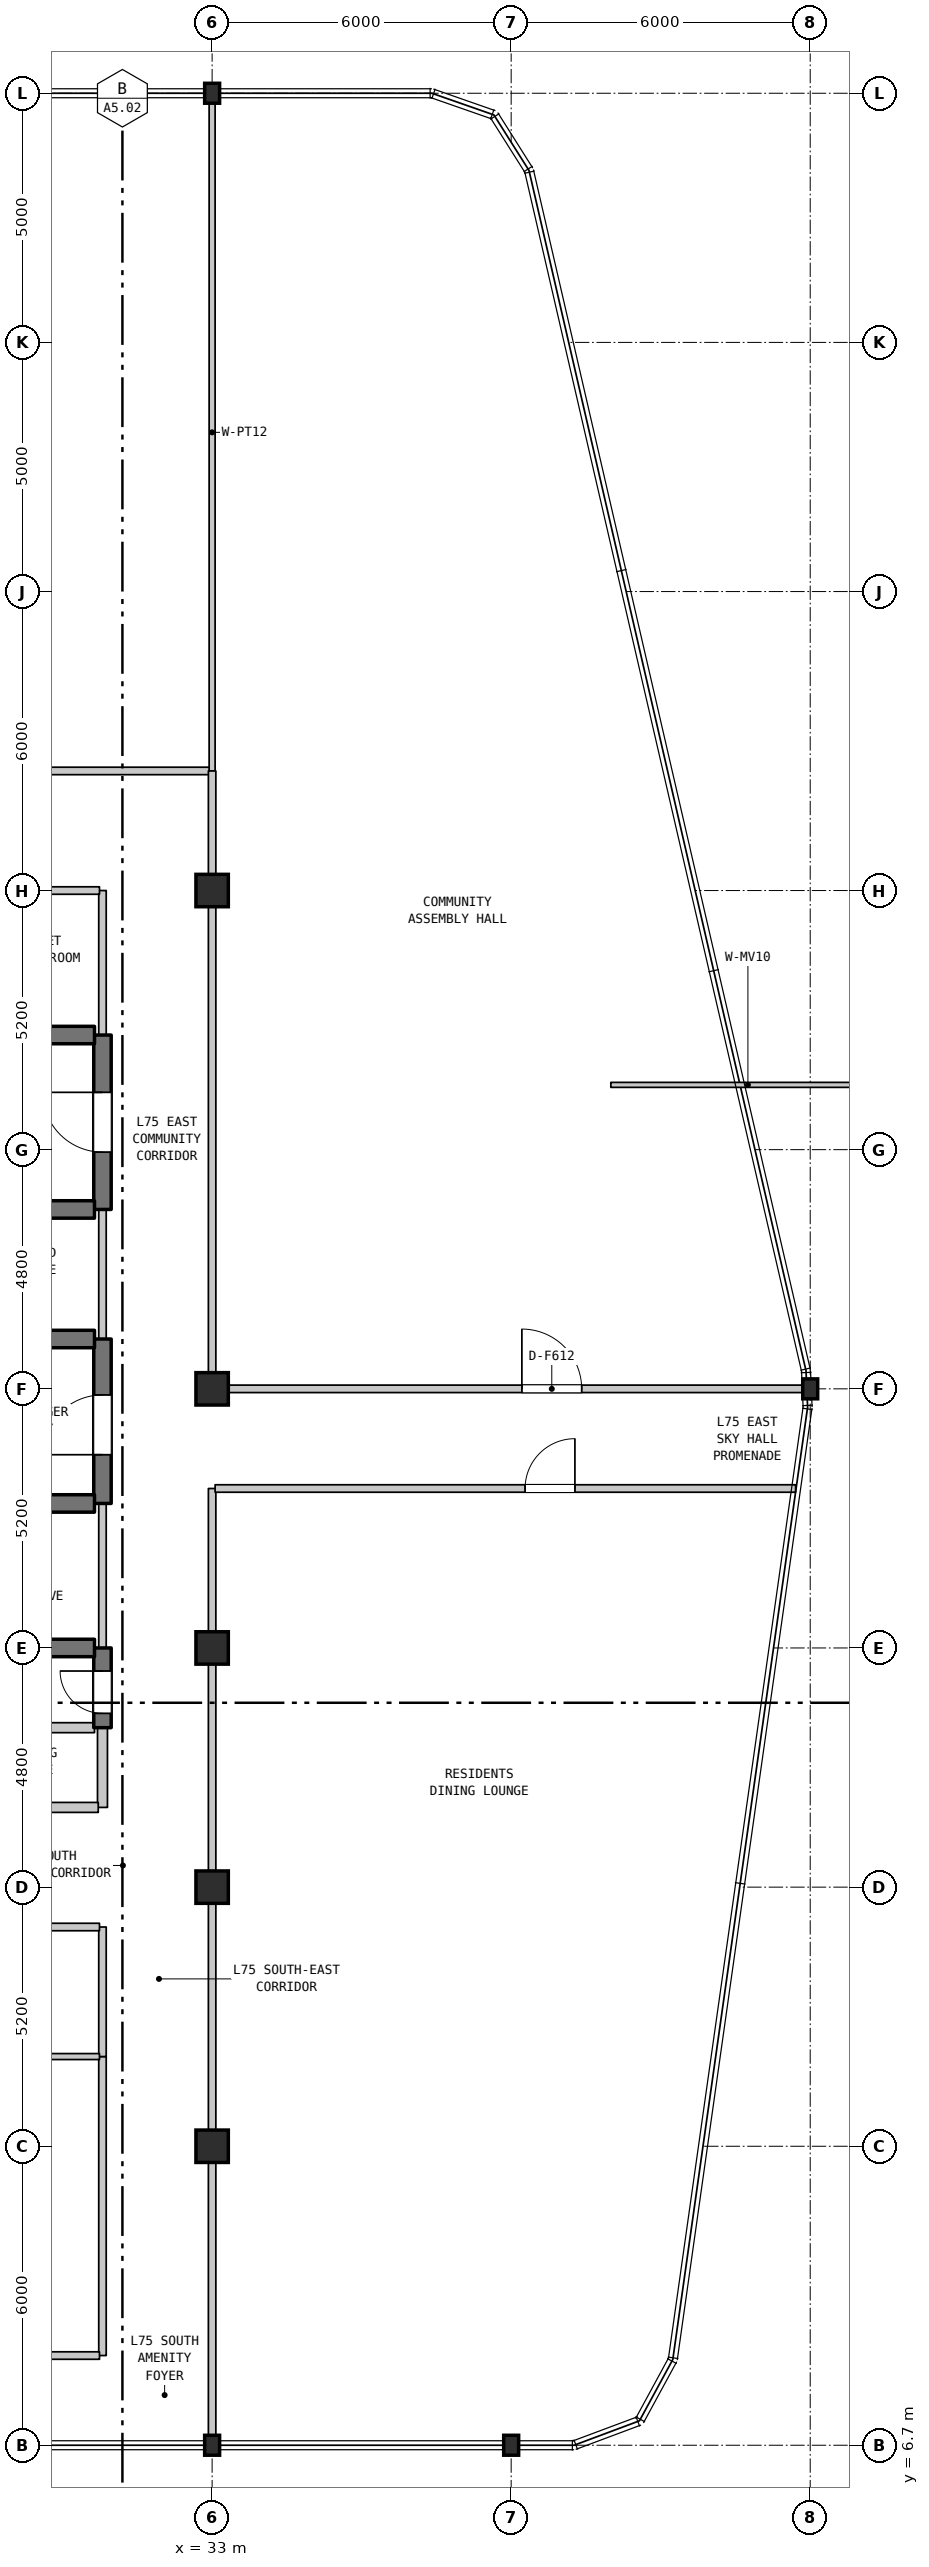
"""IFC4 building model, lengths in metres.
Left out: names, types, materials, properties, quantities, classifications, styles, units other than length and angle.
Written with IfcOpenShell. Run it as: python <this file> out.ifc"""

import sys

from ifc_helpers import new_model, si_unit, direction, frame, frame_2d, origin, origin_2d, place, context, subcontext, project, spatial, rectangle, i_section, extrude, element, fill, save


model = new_model("IFC4")
c1 = context("Model", 3, precision=1e-05, world=origin(), true_north=direction((0.0, 1.0)))
c2 = subcontext(c1, "Body", "Model", "MODEL_VIEW")
j1 = project(units=[si_unit("LENGTHUNIT", "METRE"), si_unit("PLANEANGLEUNIT", "RADIAN")], contexts=[c1])
p1 = place(None, origin())
s1 = spatial("IfcSite", under=j1, at=p1, CompositionType="ELEMENT")
p2 = place(p1, origin())
s2 = spatial("IfcBuilding", under=s1, at=p2, CompositionType="ELEMENT")
p3 = place(p2, frame((0.0, 0.0, 299.1)))
s3 = spatial("IfcBuildingStorey", under=s2, at=p3, CompositionType="ELEMENT", Elevation=299.1)
p4 = place(p3, frame((33.0, 6.7, 0.0), z_axis=(0.0, 0.0, 1.0), x_axis=(1.0, 0.0, 0.0)))
e1 = element("IfcColumn", 1, at=p4, inside=s3, PredefinedType="COLUMN", context=c2, shape_type="SweptSolid", body=[
    extrude(i_section(OverallWidth=0.3, OverallDepth=0.4, WebThickness=0.013, FlangeThickness=0.024, FilletRadius=0.027, at=origin_2d()), origin(), (0.0, 0.0, 1.0), 4.5),
])
for number, where, z_axis, x_axis in (
    (2, (33.0, 12.7, 0.0), (0.0, 0.0, 1.0), (1.0, 0.0, 0.0)),
    (3, (33.0, 17.9, 0.0), (0.0, 0.0, 1.0), (1.0, 0.0, 0.0)),
    (4, (33.0, 22.7, 0.0), (0.0, 0.0, 1.0), (1.0, 0.0, 0.0)),
    (5, (33.0, 27.9, 0.0), (0.0, 0.0, 1.0), (1.0, 0.0, 0.0)),
    (6, (33.0, 37.9, 0.0), (0.0, 0.0, 1.0), (1.0, 0.0, 0.0)),
):
    element("IfcColumn", number, at=place(p3, frame(where, z_axis=z_axis, x_axis=x_axis)), inside=s3, PredefinedType="COLUMN", context=c2, shape_type="SweptSolid", body=[
        extrude(rectangle(XDim=0.65, YDim=0.65, at=origin_2d()), origin(), (0.0, 0.0, 1.0), 4.5),
    ])
for number, where, z_axis, x_axis in (
    (7, (33.0, 53.9, 0.0), (0.0, 0.0, 1.0), (1.0, 0.0, 0.0)),
    (8, (39.0, 6.7, 0.0), (0.0, 0.0, 1.0), (1.0, 0.0, 0.0)),
    (9, (45.0, 27.9, 0.0), (0.0, 0.0, 1.0), (1.0, 0.0, 0.0)),
):
    element("IfcColumn", number, at=place(p3, frame(where, z_axis=z_axis, x_axis=x_axis)), inside=s3, PredefinedType="COLUMN", context=c2, shape_type="SweptSolid", body=[
        extrude(i_section(OverallWidth=0.3, OverallDepth=0.4, WebThickness=0.013, FlangeThickness=0.024, FilletRadius=0.027, at=origin_2d()), origin(), (0.0, 0.0, 1.0), 4.5),
    ])
p5 = place(p3, frame((30.8, 8.5, 0.0), z_axis=(0.0, 0.0, 1.0), x_axis=(0.0, 1.0, 0.0)))
e10 = element("IfcWall", 10, at=p5, inside=s3, PredefinedType="STANDARD", context=c2, shape_type="SweptSolid", body=[
    extrude(rectangle(XDim=6.0, YDim=0.15, at=frame_2d((3.0, 0.0))), origin(), (0.0, 0.0, 1.0), 4.19),
])
p6 = place(p3, frame((30.8, 14.5, 0.0), z_axis=(0.0, 0.0, 1.0), x_axis=(0.0, 1.0, 0.0)))
e11 = element("IfcWall", 11, at=p6, inside=s3, PredefinedType="STANDARD", context=c2, shape_type="SweptSolid", body=[
    extrude(rectangle(XDim=2.6, YDim=0.15, at=frame_2d((1.3, 0.0))), origin(), (0.0, 0.0, 1.0), 4.19),
])
p7 = place(p3, frame((30.8, 19.5, 0.0), z_axis=(0.0, 0.0, 1.0), x_axis=(0.0, 1.0, 0.0)))
e12 = element("IfcWall", 12, at=p7, inside=s3, PredefinedType="STANDARD", context=c2, shape_type="SweptSolid", body=[
    extrude(rectangle(XDim=1.6, YDim=0.2, at=frame_2d((0.8, 0.0))), origin(), (0.0, 0.0, 1.0), 4.19),
])
p8 = place(p3, frame((30.8, 21.1, 0.0), z_axis=(0.0, 0.0, 1.0), x_axis=(0.0, 1.0, 0.0)))
e13 = element("IfcWall", 13, at=p8, inside=s3, PredefinedType="SHEAR", context=c2, shape_type="SweptSolid", body=[
    extrude(rectangle(XDim=1.6, YDim=0.35, at=frame_2d((0.8, 0.0))), origin(), (0.0, 0.0, 1.0), 4.19),
])
p9 = place(p8, frame((0.287, 0.0, 0.0)))
e14 = element("IfcOpeningElement", 14, at=p9, cuts=e13, PredefinedType="OPENING", context=c2, shape_type="SweptSolid", body=[
    extrude(rectangle(XDim=0.85, YDim=2.1, at=frame_2d((0.425, 1.05))), frame((0.0, 0.185, 0.0), z_axis=(0.0, -1.0, 0.0), x_axis=(1.0, 0.0, 0.0)), (0.0, 0.0, 1.0), 0.37),
])
p10 = place(p3, frame((30.8, 22.7, 0.0), z_axis=(0.0, 0.0, 1.0), x_axis=(0.0, 1.0, 0.0)))
e15 = element("IfcWall", 15, at=p10, inside=s3, PredefinedType="STANDARD", context=c2, shape_type="SweptSolid", body=[
    extrude(rectangle(XDim=2.9, YDim=0.15, at=frame_2d((1.45, 0.0))), origin(), (0.0, 0.0, 1.0), 4.19),
])
p11 = place(p3, frame((30.8, 25.6, 0.0), z_axis=(0.0, 0.0, 1.0), x_axis=(0.0, 1.0, 0.0)))
e16 = element("IfcWall", 16, at=p11, inside=s3, PredefinedType="SHEAR", context=c2, shape_type="SweptSolid", body=[
    extrude(rectangle(XDim=3.3, YDim=0.35, at=frame_2d((1.65, 0.0))), origin(), (0.0, 0.0, 1.0), 4.19),
])
p12 = place(p11, frame((0.978, 0.0, 0.0)))
e17 = element("IfcOpeningElement", 17, at=p12, cuts=e16, PredefinedType="OPENING", context=c2, shape_type="SweptSolid", body=[
    extrude(rectangle(XDim=1.2, YDim=2.2, at=frame_2d((0.6, 1.1))), frame((0.0, 0.185, 0.0), z_axis=(0.0, -1.0, 0.0), x_axis=(1.0, 0.0, 0.0)), (0.0, 0.0, 1.0), 0.37),
])
p13 = place(p3, frame((30.8, 28.9, 0.0), z_axis=(0.0, 0.0, 1.0), x_axis=(0.0, 1.0, 0.0)))
e18 = element("IfcWall", 18, at=p13, inside=s3, PredefinedType="STANDARD", context=c2, shape_type="SweptSolid", body=[
    extrude(rectangle(XDim=2.6, YDim=0.15, at=frame_2d((1.3, 0.0))), origin(), (0.0, 0.0, 1.0), 4.19),
])
p14 = place(p3, frame((30.8, 31.5, 0.0), z_axis=(0.0, 0.0, 1.0), x_axis=(0.0, 1.0, 0.0)))
e19 = element("IfcWall", 19, at=p14, inside=s3, PredefinedType="SHEAR", context=c2, shape_type="SweptSolid", body=[
    extrude(rectangle(XDim=3.5, YDim=0.35, at=frame_2d((1.75, 0.0))), origin(), (0.0, 0.0, 1.0), 4.19),
])
p15 = place(p14, frame((1.15, 0.0, 0.0)))
e20 = element("IfcOpeningElement", 20, at=p15, cuts=e19, PredefinedType="OPENING", context=c2, shape_type="SweptSolid", body=[
    extrude(rectangle(XDim=1.2, YDim=2.2, at=frame_2d((0.6, 1.1))), frame((0.0, 0.185, 0.0), z_axis=(0.0, -1.0, 0.0), x_axis=(1.0, 0.0, 0.0)), (0.0, 0.0, 1.0), 0.37),
])
p16 = place(p3, frame((30.8, 35.0, 0.0), z_axis=(0.0, 0.0, 1.0), x_axis=(0.0, 1.0, 0.0)))
e21 = element("IfcWall", 21, at=p16, inside=s3, PredefinedType="STANDARD", context=c2, shape_type="SweptSolid", body=[
    extrude(rectangle(XDim=2.9, YDim=0.15, at=frame_2d((1.45, 0.0))), origin(), (0.0, 0.0, 1.0), 4.19),
])
p17 = place(p3, frame((33.0, 6.71, 0.0), z_axis=(0.0, 0.0, 1.0), x_axis=(0.0, 1.0, 0.0)))
e22 = element("IfcWall", 22, at=p17, inside=s3, PredefinedType="STANDARD", context=c2, shape_type="SweptSolid", body=[
    extrude(rectangle(XDim=19.19, YDim=0.15, at=frame_2d((9.595, 0.0))), origin(), (0.0, 0.0, 1.0), 3.9),
])
p18 = place(p3, frame((33.0, 27.9, 0.0), z_axis=(0.0, 0.0, 1.0), x_axis=(0.0, 1.0, 0.0)))
e23 = element("IfcWall", 23, at=p18, inside=s3, PredefinedType="STANDARD", context=c2, shape_type="SweptSolid", body=[
    extrude(rectangle(XDim=10.0, YDim=0.15, at=frame_2d((5.0, 0.0))), origin(), (0.0, 0.0, 1.0), 3.69),
])
p19 = place(p3, frame((33.0, 40.3, 0.0), z_axis=(0.0, 0.0, 1.0), x_axis=(0.0, 1.0, 0.0)))
e24 = element("IfcWall", 24, at=p19, inside=s3, PredefinedType="PARTITIONING", context=c2, shape_type="SweptSolid", body=[
    extrude(rectangle(XDim=13.59, YDim=0.12, at=frame_2d((6.795, 0.0))), origin(), (0.0, 0.0, 1.0), 3.59),
])
p20 = place(p3, frame((25.245, 8.5, 0.0), z_axis=(0.0, 0.0, 1.0), x_axis=(1.0, 0.0, 0.0)))
e25 = element("IfcWall", 25, at=p20, inside=s3, PredefinedType="STANDARD", context=c2, shape_type="SweptSolid", body=[
    extrude(rectangle(XDim=5.495, YDim=0.15, at=frame_2d((2.748, 0.0))), origin(), (0.0, 0.0, 1.0), 4.19),
])
p21 = place(p20, frame((2.469, 0.0, 0.0)))
e26 = element("IfcOpeningElement", 26, at=p21, cuts=e25, PredefinedType="OPENING", context=c2, shape_type="SweptSolid", body=[
    extrude(rectangle(XDim=1.0, YDim=2.15, at=frame_2d((0.5, 1.075))), frame((0.0, 0.085, 0.0), z_axis=(0.0, -1.0, 0.0), x_axis=(1.0, 0.0, 0.0)), (0.0, 0.0, 1.0), 0.17),
])
p22 = place(p3, frame((27.045, 14.5, 0.0), z_axis=(0.0, 0.0, 1.0), x_axis=(1.0, 0.0, 0.0)))
e27 = element("IfcWall", 27, at=p22, inside=s3, PredefinedType="PARTITIONING", context=c2, shape_type="SweptSolid", body=[
    extrude(rectangle(XDim=3.695, YDim=0.12, at=frame_2d((1.848, 0.0))), origin(), (0.0, 0.0, 1.0), 4.19),
])
p23 = place(p3, frame((27.045, 17.1, 0.0), z_axis=(0.0, 0.0, 1.0), x_axis=(1.0, 0.0, 0.0)))
e28 = element("IfcWall", 28, at=p23, inside=s3, PredefinedType="STANDARD", context=c2, shape_type="SweptSolid", body=[
    extrude(rectangle(XDim=3.695, YDim=0.15, at=frame_2d((1.848, 0.0))), origin(), (0.0, 0.0, 1.0), 4.19),
])
p24 = place(p3, frame((27.285, 19.5, 0.0), z_axis=(0.0, 0.0, 1.0), x_axis=(1.0, 0.0, 0.0)))
e29 = element("IfcWall", 29, at=p24, inside=s3, PredefinedType="STANDARD", context=c2, shape_type="SweptSolid", body=[
    extrude(rectangle(XDim=3.43, YDim=0.2, at=frame_2d((1.715, 0.0))), origin(), (0.0, 0.0, 1.0), 4.19),
])
p25 = place(p24, frame((1.192, 0.0, 0.0)))
e30 = element("IfcOpeningElement", 30, at=p25, cuts=e29, PredefinedType="OPENING", context=c2, shape_type="SweptSolid", body=[
    extrude(rectangle(XDim=0.9, YDim=2.15, at=frame_2d((0.45, 1.075))), frame((0.0, 0.11, 0.0), z_axis=(0.0, -1.0, 0.0), x_axis=(1.0, 0.0, 0.0)), (0.0, 0.0, 1.0), 0.22),
])
p26 = place(p3, frame((27.285, 21.1, 0.0), z_axis=(0.0, 0.0, 1.0), x_axis=(1.0, 0.0, 0.0)))
e31 = element("IfcWall", 31, at=p26, inside=s3, PredefinedType="STANDARD", context=c2, shape_type="SweptSolid", body=[
    extrude(rectangle(XDim=3.355, YDim=0.2, at=frame_2d((1.677, 0.0))), origin(), (0.0, 0.0, 1.0), 4.19),
])
p27 = place(p3, frame((27.46, 22.7, 0.0), z_axis=(0.0, 0.0, 1.0), x_axis=(1.0, 0.0, 0.0)))
e32 = element("IfcWall", 32, at=p27, inside=s3, PredefinedType="SHEAR", context=c2, shape_type="SweptSolid", body=[
    extrude(rectangle(XDim=3.18, YDim=0.35, at=frame_2d((1.59, 0.0))), origin(), (0.0, 0.0, 1.0), 4.19),
])
p28 = place(p3, frame((27.46, 25.6, 0.0), z_axis=(0.0, 0.0, 1.0), x_axis=(1.0, 0.0, 0.0)))
e33 = element("IfcWall", 33, at=p28, inside=s3, PredefinedType="SHEAR", context=c2, shape_type="SweptSolid", body=[
    extrude(rectangle(XDim=3.18, YDim=0.35, at=frame_2d((1.59, 0.0))), origin(), (0.0, 0.0, 1.0), 4.19),
])
p29 = place(p28, frame((1.115, 0.0, 0.0)))
e34 = element("IfcOpeningElement", 34, at=p29, cuts=e33, PredefinedType="OPENING", context=c2, shape_type="SweptSolid", body=[
    extrude(rectangle(XDim=0.95, YDim=2.15, at=frame_2d((0.475, 1.075))), frame((0.0, 0.185, 0.0), z_axis=(0.0, -1.0, 0.0), x_axis=(1.0, 0.0, 0.0)), (0.0, 0.0, 1.0), 0.37),
])
p30 = place(p3, frame((33.06, 25.9, 0.0), z_axis=(0.0, 0.0, 1.0), x_axis=(1.0, 0.0, 0.0)))
e35 = element("IfcWall", 35, at=p30, inside=s3, PredefinedType="STANDARD", context=c2, shape_type="SweptSolid", body=[
    extrude(rectangle(XDim=11.647, YDim=0.15, at=frame_2d((5.823, 0.0))), origin(), (0.0, 0.0, 1.0), 4.19),
])
p31 = place(p30, frame((6.219, 0.0, 0.0)))
e36 = element("IfcOpeningElement", 36, at=p31, cuts=e35, PredefinedType="OPENING", context=c2, shape_type="SweptSolid", body=[
    extrude(rectangle(XDim=1.0, YDim=2.15, at=frame_2d((0.5, 1.075))), frame((0.0, 0.085, 0.0), z_axis=(0.0, -1.0, 0.0), x_axis=(1.0, 0.0, 0.0)), (0.0, 0.0, 1.0), 0.17),
])
p32 = place(p3, frame((33.06, 27.9, 0.0), z_axis=(0.0, 0.0, 1.0), x_axis=(1.0, 0.0, 0.0)))
e37 = element("IfcWall", 37, at=p32, inside=s3, PredefinedType="STANDARD", context=c2, shape_type="SweptSolid", body=[
    extrude(rectangle(XDim=11.862, YDim=0.15, at=frame_2d((5.931, 0.0))), origin(), (0.0, 0.0, 1.0), 3.69),
])
p33 = place(p32, frame((6.155, 0.0, 0.0)))
e38 = element("IfcOpeningElement", 38, at=p33, cuts=e37, PredefinedType="OPENING", context=c2, shape_type="SweptSolid", body=[
    extrude(rectangle(XDim=1.2, YDim=2.2, at=frame_2d((0.6, 1.1))), frame((0.0, 0.085, 0.0), z_axis=(0.0, -1.0, 0.0), x_axis=(1.0, 0.0, 0.0)), (0.0, 0.0, 1.0), 0.17),
])
p34 = place(p3, frame((27.46, 28.9, 0.0), z_axis=(0.0, 0.0, 1.0), x_axis=(1.0, 0.0, 0.0)))
e39 = element("IfcWall", 39, at=p34, inside=s3, PredefinedType="SHEAR", context=c2, shape_type="SweptSolid", body=[
    extrude(rectangle(XDim=3.18, YDim=0.35, at=frame_2d((1.59, 0.0))), origin(), (0.0, 0.0, 1.0), 4.19),
])
p35 = place(p34, frame((1.115, 0.0, 0.0)))
e40 = element("IfcOpeningElement", 40, at=p35, cuts=e39, PredefinedType="OPENING", context=c2, shape_type="SweptSolid", body=[
    extrude(rectangle(XDim=0.95, YDim=2.15, at=frame_2d((0.475, 1.075))), frame((0.0, 0.185, 0.0), z_axis=(0.0, -1.0, 0.0), x_axis=(1.0, 0.0, 0.0)), (0.0, 0.0, 1.0), 0.37),
])
p36 = place(p3, frame((27.46, 31.5, 0.0), z_axis=(0.0, 0.0, 1.0), x_axis=(1.0, 0.0, 0.0)))
e41 = element("IfcWall", 41, at=p36, inside=s3, PredefinedType="SHEAR", context=c2, shape_type="SweptSolid", body=[
    extrude(rectangle(XDim=3.18, YDim=0.35, at=frame_2d((1.59, 0.0))), origin(), (0.0, 0.0, 1.0), 4.19),
])
p37 = place(p3, frame((26.645, 35.0, 0.0), z_axis=(0.0, 0.0, 1.0), x_axis=(1.0, 0.0, 0.0)))
e42 = element("IfcWall", 42, at=p37, inside=s3, PredefinedType="SHEAR", context=c2, shape_type="SweptSolid", body=[
    extrude(rectangle(XDim=3.995, YDim=0.35, at=frame_2d((1.998, 0.0))), origin(), (0.0, 0.0, 1.0), 4.19),
])
p38 = place(p37, frame((1.508, 0.0, 0.0)))
e43 = element("IfcOpeningElement", 43, at=p38, cuts=e42, PredefinedType="OPENING", context=c2, shape_type="SweptSolid", body=[
    extrude(rectangle(XDim=0.95, YDim=2.15, at=frame_2d((0.475, 1.075))), frame((0.0, 0.185, 0.0), z_axis=(0.0, -1.0, 0.0), x_axis=(1.0, 0.0, 0.0)), (0.0, 0.0, 1.0), 0.37),
])
p39 = place(p3, frame((26.645, 37.9, 0.0), z_axis=(0.0, 0.0, 1.0), x_axis=(1.0, 0.0, 0.0)))
e44 = element("IfcWall", 44, at=p39, inside=s3, PredefinedType="STANDARD", context=c2, shape_type="SweptSolid", body=[
    extrude(rectangle(XDim=4.095, YDim=0.15, at=frame_2d((2.047, 0.0))), origin(), (0.0, 0.0, 1.0), 3.69),
])
p40 = place(p3, frame((15.045, 40.3, 0.0), z_axis=(0.0, 0.0, 1.0), x_axis=(1.0, 0.0, 0.0)))
e45 = element("IfcWall", 45, at=p40, inside=s3, PredefinedType="STANDARD", context=c2, shape_type="SweptSolid", body=[
    extrude(rectangle(XDim=17.895, YDim=0.15, at=frame_2d((8.948, 0.0))), origin(), (0.0, 0.0, 1.0), 4.19),
])
p41 = place(p40, frame((9.205, 0.0, 0.0)))
e46 = element("IfcOpeningElement", 46, at=p41, cuts=e45, PredefinedType="OPENING", context=c2, shape_type="SweptSolid", body=[
    extrude(rectangle(XDim=1.0, YDim=2.15, at=frame_2d((0.5, 1.075))), frame((0.0, 0.085, 0.0), z_axis=(0.0, -1.0, 0.0), x_axis=(1.0, 0.0, 0.0)), (0.0, 0.0, 1.0), 0.17),
])
p42 = place(p3, frame((41.0, 34.0, 0.0), z_axis=(0.0, 0.0, 1.0), x_axis=(1.0, 0.0, 0.0)))
e47 = element("IfcWall", 47, at=p42, inside=s3, PredefinedType="MOVABLE", context=c2, shape_type="SweptSolid", body=[
    extrude(rectangle(XDim=5.5, YDim=0.1, at=frame_2d((2.75, 0.0))), origin(), (0.0, 0.0, 1.0), 4.14),
])
p43 = place(p3, frame((33.0, 37.9, 0.0), z_axis=(0.0, 0.0, 1.0), x_axis=(0.0, 1.0, 0.0)))
e48 = element("IfcWall", 48, at=p43, inside=s3, PredefinedType="STANDARD", context=c2, shape_type="SweptSolid", body=[
    extrude(rectangle(XDim=2.4, YDim=0.15, at=frame_2d((1.2, 0.0))), origin(), (0.0, 0.0, 1.0), 3.59),
])
p44 = place(p9, origin())
e49 = element("IfcDoor", 49, at=p44, inside=s3, OperationType="SINGLE_SWING_RIGHT", PredefinedType="DOOR", context=c2, shape_type="SweptSolid", body=[
    extrude(rectangle(XDim=0.85, YDim=2.1, at=frame_2d((0.425, 1.05))), frame((0.0, 0.025, 0.0), z_axis=(0.0, -1.0, 0.0), x_axis=(1.0, 0.0, 0.0)), (0.0, 0.0, 1.0), 0.05),
])
fill(e14, e49)
p45 = place(p12, origin())
e50 = element("IfcDoor", 50, at=p45, inside=s3, OperationType="SINGLE_SWING_LEFT", PredefinedType="DOOR", context=c2, shape_type="SweptSolid", body=[
    extrude(rectangle(XDim=1.2, YDim=2.2, at=frame_2d((0.6, 1.1))), frame((0.0, 0.025, 0.0), z_axis=(0.0, -1.0, 0.0), x_axis=(1.0, 0.0, 0.0)), (0.0, 0.0, 1.0), 0.05),
])
fill(e17, e50)
p46 = place(p15, origin())
e51 = element("IfcDoor", 51, at=p46, inside=s3, OperationType="SINGLE_SWING_RIGHT", PredefinedType="DOOR", context=c2, shape_type="SweptSolid", body=[
    extrude(rectangle(XDim=1.2, YDim=2.2, at=frame_2d((0.6, 1.1))), frame((0.0, 0.025, 0.0), z_axis=(0.0, -1.0, 0.0), x_axis=(1.0, 0.0, 0.0)), (0.0, 0.0, 1.0), 0.05),
])
fill(e20, e51)
p47 = place(p31, origin())
e52 = element("IfcDoor", 52, at=p47, inside=s3, OperationType="SINGLE_SWING_RIGHT", PredefinedType="DOOR", context=c2, shape_type="SweptSolid", body=[
    extrude(rectangle(XDim=1.0, YDim=2.15, at=frame_2d((0.5, 1.075))), frame((0.0, 0.025, 0.0), z_axis=(0.0, -1.0, 0.0), x_axis=(1.0, 0.0, 0.0)), (0.0, 0.0, 1.0), 0.05),
])
fill(e36, e52)
p48 = place(p33, origin())
e53 = element("IfcDoor", 53, at=p48, inside=s3, OperationType="SINGLE_SWING_LEFT", PredefinedType="DOOR", context=c2, shape_type="SweptSolid", body=[
    extrude(rectangle(XDim=1.2, YDim=2.2, at=frame_2d((0.6, 1.1))), frame((0.0, 0.025, 0.0), z_axis=(0.0, -1.0, 0.0), x_axis=(1.0, 0.0, 0.0)), (0.0, 0.0, 1.0), 0.05),
])
fill(e38, e53)
save(model, sys.argv[1])
